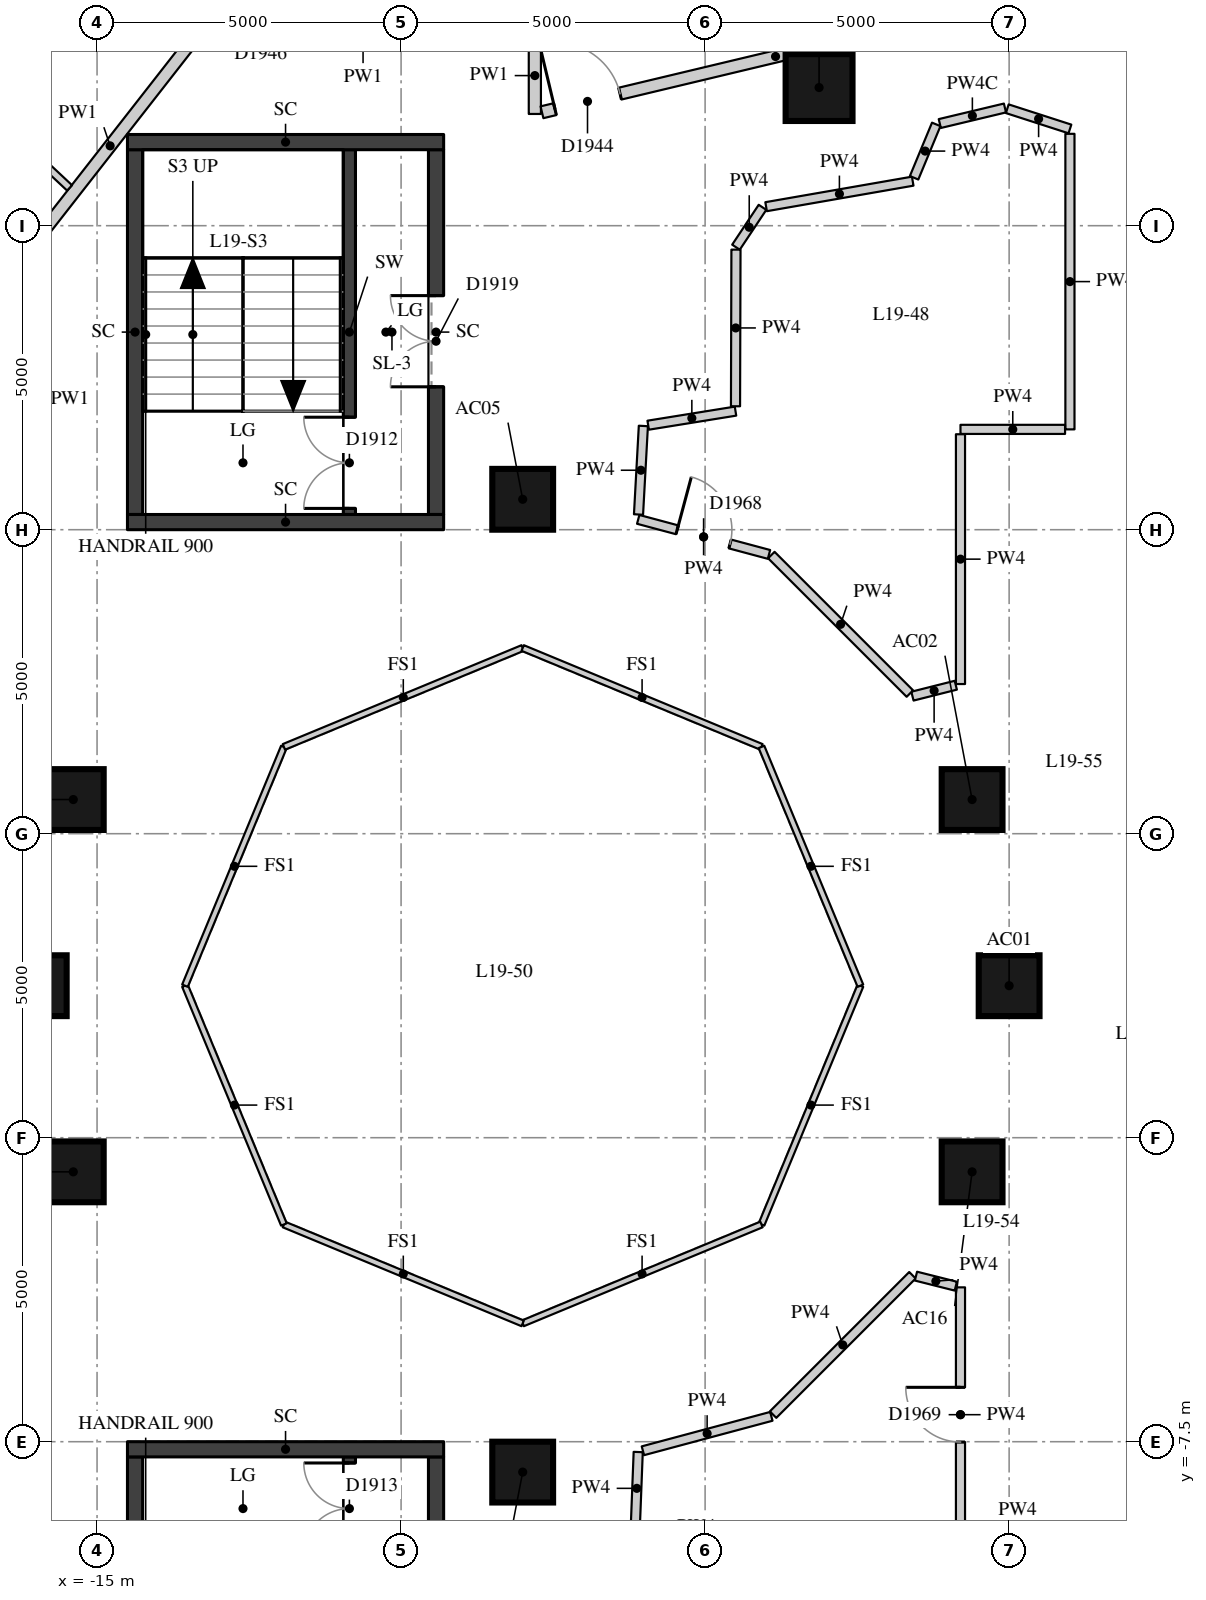
"""IFC4 building model, lengths in metres.
Left out: names, types, materials, properties, quantities, classifications, styles, units other than length and angle.
Written with IfcOpenShell. Run it as: python <this file> out.ifc"""

import sys

from ifc_helpers import new_model, si_unit, direction, frame, frame_2d, origin, origin_2d, place, context, subcontext, project, spatial, rectangle, extrude, element, fill, save


model = new_model("IFC4")
c1 = context("Model", 3, precision=1e-05, world=origin(), true_north=direction((0.0, 1.0)))
c2 = subcontext(c1, "Body", "Model", "MODEL_VIEW")
j1 = project(units=[si_unit("LENGTHUNIT", "METRE"), si_unit("PLANEANGLEUNIT", "RADIAN")], contexts=[c1])
p1 = place(None, origin())
s1 = spatial("IfcSite", under=j1, at=p1, CompositionType="ELEMENT")
p2 = place(p1, origin())
s2 = spatial("IfcBuilding", under=s1, at=p2, CompositionType="ELEMENT")
p3 = place(p2, frame((0.0, 0.0, 71.2)))
s3 = spatial("IfcBuildingStorey", under=s2, at=p3, CompositionType="ELEMENT", Elevation=71.2)
for number, where, z_axis, x_axis in (
    (1, (0.0, 0.0, 0.0), (0.0, 0.0, 1.0), (1.0, 0.0, 0.0)),
    (2, (-0.609, 3.062, 0.0), (0.0, 0.0, 1.0), (1.0, 0.0, 0.0)),
    (3, (-8.0, 8.0, 0.0), (0.0, 0.0, 1.0), (1.0, 0.0, 0.0)),
    (4, (-15.391, 3.062, 0.0), (0.0, 0.0, 1.0), (1.0, 0.0, 0.0)),
    (5, (-16.0, 0.0, 0.0), (0.0, 0.0, 1.0), (1.0, 0.0, 0.0)),
    (6, (-15.391, -3.062, 0.0), (0.0, 0.0, 1.0), (1.0, 0.0, 0.0)),
    (7, (-8.0, -8.0, 0.0), (0.0, 0.0, 1.0), (1.0, 0.0, 0.0)),
    (8, (-0.609, -3.062, 0.0), (0.0, 0.0, 1.0), (1.0, 0.0, 0.0)),
):
    element("IfcColumn", number, at=place(p3, frame(where, z_axis=z_axis, x_axis=x_axis)), inside=s3, PredefinedType="COLUMN", context=c2, shape_type="SweptSolid", body=[
        extrude(rectangle(XDim=1.0, YDim=1.0, at=origin_2d()), origin(), (0.0, 0.0, 1.0), 3.3),
    ])
p4 = place(p3, frame((-3.126, 14.772, 0.0), z_axis=(0.0, 0.0, 1.0), x_axis=(1.0, 0.0, 0.0)))
e9 = element("IfcColumn", 9, at=p4, inside=s3, PredefinedType="COLUMN", context=c2, shape_type="SweptSolid", body=[
    extrude(rectangle(XDim=1.1, YDim=1.1, at=origin_2d()), origin(), (0.0, 0.0, 1.0), 3.3),
])
p5 = place(p3, frame((-10.85, 7.75, 0.0), z_axis=(0.0, 0.0, 1.0), x_axis=(0.0, 1.0, 0.0)))
e10 = element("IfcWall", 10, at=p5, inside=s3, PredefinedType="SHEAR", context=c2, shape_type="SweptSolid", body=[
    extrude(rectangle(XDim=6.0, YDim=0.2, at=frame_2d((3.0, 0.0))), origin(), (0.0, 0.0, 1.0), 3.02),
])
p6 = place(p5, frame((0.1, 0.0, 0.0)))
e11 = element("IfcOpeningElement", 11, at=p6, cuts=e10, PredefinedType="OPENING", context=c2, shape_type="SweptSolid", body=[
    extrude(rectangle(XDim=1.5, YDim=2.1, at=frame_2d((0.75, 1.05))), frame((0.0, 0.11, 0.0), z_axis=(0.0, -1.0, 0.0), x_axis=(1.0, 0.0, 0.0)), (0.0, 0.0, 1.0), 0.22),
])
p7 = place(p3, frame((-10.85, -13.75, 0.0), z_axis=(0.0, 0.0, 1.0), x_axis=(0.0, 1.0, 0.0)))
e12 = element("IfcWall", 12, at=p7, inside=s3, PredefinedType="SHEAR", context=c2, shape_type="SweptSolid", body=[
    extrude(rectangle(XDim=6.0, YDim=0.2, at=frame_2d((3.0, 0.0))), origin(), (0.0, 0.0, 1.0), 3.02),
])
p8 = place(p7, frame((4.4, 0.0, 0.0)))
e13 = element("IfcOpeningElement", 13, at=p8, cuts=e12, PredefinedType="OPENING", context=c2, shape_type="SweptSolid", body=[
    extrude(rectangle(XDim=1.5, YDim=2.1, at=frame_2d((0.75, 1.05))), frame((0.0, 0.11, 0.0), z_axis=(0.0, -1.0, 0.0), x_axis=(1.0, 0.0, 0.0)), (0.0, 0.0, 1.0), 0.22),
])
p9 = place(p3, frame((-14.375, 7.75, -0.28), z_axis=(0.0, 0.0, 1.0), x_axis=(0.0, 1.0, 0.0)))
e14 = element("IfcWall", 14, at=p9, inside=s3, PredefinedType="SHEAR", context=c2, shape_type="SweptSolid", body=[
    extrude(rectangle(XDim=6.0, YDim=0.25, at=frame_2d((3.0, 0.0))), origin(), (0.0, 0.0, 1.0), 3.3),
])
p10 = place(p3, frame((-9.425, 7.75, -0.28), z_axis=(0.0, 0.0, 1.0), x_axis=(0.0, 1.0, 0.0)))
e15 = element("IfcWall", 15, at=p10, inside=s3, PredefinedType="SHEAR", context=c2, shape_type="SweptSolid", body=[
    extrude(rectangle(XDim=6.0, YDim=0.25, at=frame_2d((3.0, 0.0))), origin(), (0.0, 0.0, 1.0), 3.3),
])
p11 = place(p10, frame((2.1, 0.0, 0.28)))
e16 = element("IfcOpeningElement", 16, at=p11, cuts=e15, PredefinedType="OPENING", context=c2, shape_type="SweptSolid", body=[
    extrude(rectangle(XDim=1.5, YDim=2.1, at=frame_2d((0.75, 1.05))), frame((0.0, 0.135, 0.0), z_axis=(0.0, -1.0, 0.0), x_axis=(1.0, 0.0, 0.0)), (0.0, 0.0, 1.0), 0.27),
])
for number, where, z_axis, x_axis in (
    (17, (-14.5, 13.875, -0.28), (0.0, 0.0, 1.0), (1.0, 0.0, 0.0)),
    (18, (-14.5, 7.625, -0.28), (0.0, 0.0, 1.0), (1.0, 0.0, 0.0)),
):
    element("IfcWall", number, at=place(p3, frame(where, z_axis=z_axis, x_axis=x_axis)), inside=s3, PredefinedType="SHEAR", context=c2, shape_type="SweptSolid", body=[
        extrude(rectangle(XDim=5.2, YDim=0.25, at=frame_2d((2.6, 0.0))), origin(), (0.0, 0.0, 1.0), 3.3),
    ])
p12 = place(p3, frame((-14.375, -13.75, -0.28), z_axis=(0.0, 0.0, 1.0), x_axis=(0.0, 1.0, 0.0)))
e19 = element("IfcWall", 19, at=p12, inside=s3, PredefinedType="SHEAR", context=c2, shape_type="SweptSolid", body=[
    extrude(rectangle(XDim=6.0, YDim=0.25, at=frame_2d((3.0, 0.0))), origin(), (0.0, 0.0, 1.0), 3.3),
])
p13 = place(p3, frame((-9.425, -13.75, -0.28), z_axis=(0.0, 0.0, 1.0), x_axis=(0.0, 1.0, 0.0)))
e20 = element("IfcWall", 20, at=p13, inside=s3, PredefinedType="SHEAR", context=c2, shape_type="SweptSolid", body=[
    extrude(rectangle(XDim=6.0, YDim=0.25, at=frame_2d((3.0, 0.0))), origin(), (0.0, 0.0, 1.0), 3.3),
])
p14 = place(p13, frame((2.4, 0.0, 0.28)))
e21 = element("IfcOpeningElement", 21, at=p14, cuts=e20, PredefinedType="OPENING", context=c2, shape_type="SweptSolid", body=[
    extrude(rectangle(XDim=1.5, YDim=2.1, at=frame_2d((0.75, 1.05))), frame((0.0, 0.135, 0.0), z_axis=(0.0, -1.0, 0.0), x_axis=(1.0, 0.0, 0.0)), (0.0, 0.0, 1.0), 0.27),
])
p15 = place(p3, frame((-14.5, -7.625, -0.28), z_axis=(0.0, 0.0, 1.0), x_axis=(1.0, 0.0, 0.0)))
e22 = element("IfcWall", 22, at=p15, inside=s3, PredefinedType="SHEAR", context=c2, shape_type="SweptSolid", body=[
    extrude(rectangle(XDim=5.2, YDim=0.25, at=frame_2d((2.6, 0.0))), origin(), (0.0, 0.0, 1.0), 3.3),
])
p16 = place(p3, frame((-16.163, 12.049, 0.0), z_axis=(0.0, 0.0, 1.0), x_axis=(0.6157435057, 0.787946657578, 0.0)))
e23 = element("IfcWall", 23, at=p16, inside=s3, PredefinedType="PARTITIONING", context=c2, shape_type="SweptSolid", body=[
    extrude(rectangle(XDim=4.477, YDim=0.2, at=frame_2d((2.239, 0.0))), origin(), (0.0, 0.0, 1.0), 3.02),
])
p17 = place(p3, frame((-7.8, 15.6, 0.0), z_axis=(0.0, 0.0, 1.0), x_axis=(0.0, -1.0, 0.0)))
e24 = element("IfcWall", 24, at=p17, inside=s3, PredefinedType="PARTITIONING", context=c2, shape_type="SweptSolid", body=[
    extrude(rectangle(XDim=1.262, YDim=0.2, at=frame_2d((0.631, 0.0))), origin(), (0.0, 0.0, 1.0), 3.02),
])
p18 = place(p3, frame((-7.683, 14.365, 0.0), z_axis=(0.0, 0.0, 1.0), x_axis=(0.972657109353, 0.23224587752, 0.0)))
e25 = element("IfcWall", 25, at=p18, inside=s3, PredefinedType="PARTITIONING", context=c2, shape_type="SweptSolid", body=[
    extrude(rectangle(XDim=7.899, YDim=0.2, at=frame_2d((3.949, 0.0))), origin(), (0.0, 0.0, 1.0), 2.57),
])
p19 = place(p18, frame((0.22, 0.0, 0.0)))
e26 = element("IfcOpeningElement", 26, at=p19, cuts=e25, PredefinedType="OPENING", context=c2, shape_type="SweptSolid", body=[
    extrude(rectangle(XDim=1.1, YDim=2.1, at=frame_2d((0.55, 1.05))), frame((0.0, 0.11, 0.0), z_axis=(0.0, -1.0, 0.0), x_axis=(1.0, 0.0, 0.0)), (0.0, 0.0, 1.0), 0.22),
])
p20 = place(p3, frame((0.095, 16.169, 0.0), z_axis=(0.0, 0.0, 1.0), x_axis=(0.951667112614, -0.307131416122, 0.0)))
e27 = element("IfcWall", 27, at=p20, inside=s3, PredefinedType="PARTITIONING", context=c2, shape_type="SweptSolid", body=[
    extrude(rectangle(XDim=8.041, YDim=0.2, at=frame_2d((4.02, 0.0))), origin(), (0.0, 0.0, 1.0), 3.02),
])
p21 = place(p20, frame((4.309, 0.0, 0.0)))
e28 = element("IfcOpeningElement", 28, at=p21, cuts=e27, PredefinedType="OPENING", context=c2, shape_type="SweptSolid", body=[
    extrude(rectangle(XDim=1.1, YDim=2.1, at=frame_2d((0.55, 1.05))), frame((0.0, 0.11, 0.0), z_axis=(0.0, -1.0, 0.0), x_axis=(1.0, 0.0, 0.0)), (0.0, 0.0, 1.0), 0.22),
])
p22 = place(p3, frame((-4.492, 12.146, 0.0), z_axis=(0.0, 0.0, 1.0), x_axis=(0.553770185429, 0.832669551341, 0.0)))
e29 = element("IfcWall", 29, at=p22, inside=s3, PredefinedType="PARTITIONING", context=c2, shape_type="SweptSolid", body=[
    extrude(rectangle(XDim=0.788, YDim=0.15, at=frame_2d((0.394, 0.0))), origin(), (0.0, 0.0, 1.0), 3.02),
])
p23 = place(p3, frame((-3.997, 12.812, 0.0), z_axis=(0.0, 0.0, 1.0), x_axis=(0.985187584004, 0.171480098917, 0.0)))
e30 = element("IfcWall", 30, at=p23, inside=s3, PredefinedType="PARTITIONING", context=c2, shape_type="SweptSolid", body=[
    extrude(rectangle(XDim=2.447, YDim=0.15, at=frame_2d((1.224, 0.0))), origin(), (0.0, 0.0, 1.0), 3.02),
])
p24 = place(p3, frame((-1.563, 13.288, 0.0), z_axis=(0.0, 0.0, 1.0), x_axis=(0.382918810849, 0.923782000419, 0.0)))
e31 = element("IfcWall", 31, at=p24, inside=s3, PredefinedType="PARTITIONING", context=c2, shape_type="SweptSolid", body=[
    extrude(rectangle(XDim=0.951, YDim=0.15, at=frame_2d((0.475, 0.0))), origin(), (0.0, 0.0, 1.0), 3.02),
])
p25 = place(p3, frame((-1.14, 14.18, 0.0), z_axis=(0.0, 0.0, 1.0), x_axis=(0.972668158826, 0.232199596913, 0.0)))
e32 = element("IfcWall", 32, at=p25, inside=s3, PredefinedType="PARTITIONING", context=c2, shape_type="SweptSolid", body=[
    extrude(rectangle(XDim=1.102, YDim=0.15, at=frame_2d((0.551, 0.0))), origin(), (0.0, 0.0, 1.0), 2.42),
])
p26 = place(p3, frame((-0.031, 14.424, 0.0), z_axis=(0.0, 0.0, 1.0), x_axis=(0.951683114319, -0.307081829354, 0.0)))
e33 = element("IfcWall", 33, at=p26, inside=s3, PredefinedType="PARTITIONING", context=c2, shape_type="SweptSolid", body=[
    extrude(rectangle(XDim=1.083, YDim=0.15, at=frame_2d((0.542, 0.0))), origin(), (0.0, 0.0, 1.0), 3.02),
])
p27 = place(p3, frame((1.0, 14.011, 0.0), z_axis=(0.0, 0.0, 1.0), x_axis=(0.0, -1.0, 0.0)))
e34 = element("IfcWall", 34, at=p27, inside=s3, PredefinedType="PARTITIONING", context=c2, shape_type="SweptSolid", body=[
    extrude(rectangle(XDim=4.861, YDim=0.15, at=frame_2d((2.431, 0.0))), origin(), (0.0, 0.0, 1.0), 3.02),
])
p28 = place(p3, frame((0.92, 9.15, 0.0), z_axis=(0.0, 0.0, 1.0), x_axis=(-1.0, 0.0, 0.0)))
e35 = element("IfcWall", 35, at=p28, inside=s3, PredefinedType="PARTITIONING", context=c2, shape_type="SweptSolid", body=[
    extrude(rectangle(XDim=1.72, YDim=0.15, at=frame_2d((0.86, 0.0))), origin(), (0.0, 0.0, 1.0), 3.02),
])
p29 = place(p3, frame((-0.8, 9.07, 0.0), z_axis=(0.0, 0.0, 1.0), x_axis=(0.0, -1.0, 0.0)))
e36 = element("IfcWall", 36, at=p29, inside=s3, PredefinedType="PARTITIONING", context=c2, shape_type="SweptSolid", body=[
    extrude(rectangle(XDim=4.108, YDim=0.15, at=frame_2d((2.054, 0.0))), origin(), (0.0, 0.0, 1.0), 3.02),
])
p30 = place(p3, frame((-0.877, 4.942, 0.0), z_axis=(0.0, 0.0, 1.0), x_axis=(-0.969671869719, -0.244410443874, 0.0)))
e37 = element("IfcWall", 37, at=p30, inside=s3, PredefinedType="PARTITIONING", context=c2, shape_type="SweptSolid", body=[
    extrude(rectangle(XDim=0.735, YDim=0.15, at=frame_2d((0.368, 0.0))), origin(), (0.0, 0.0, 1.0), 3.02),
])
p31 = place(p3, frame((-1.633, 4.805, 0.0), z_axis=(0.0, 0.0, 1.0), x_axis=(-0.707068892009, 0.707144668334, 0.0)))
e38 = element("IfcWall", 38, at=p31, inside=s3, PredefinedType="PARTITIONING", context=c2, shape_type="SweptSolid", body=[
    extrude(rectangle(XDim=3.222, YDim=0.15, at=frame_2d((1.611, 0.0))), origin(), (0.0, 0.0, 1.0), 3.02),
])
p32 = place(p3, frame((-3.949, 7.093, 0.0), z_axis=(0.0, 0.0, 1.0), x_axis=(-0.965915749371, 0.258856649746, 0.0)))
e39 = element("IfcWall", 39, at=p32, inside=s3, PredefinedType="PARTITIONING", context=c2, shape_type="SweptSolid", body=[
    extrude(rectangle(XDim=2.227, YDim=0.15, at=frame_2d((1.113, 0.0))), origin(), (0.0, 0.0, 1.0), 3.02),
])
p33 = place(p32, frame((0.663, 0.0, 0.0)))
e40 = element("IfcOpeningElement", 40, at=p33, cuts=e39, PredefinedType="OPENING", context=c2, shape_type="SweptSolid", body=[
    extrude(rectangle(XDim=0.9, YDim=2.1, at=frame_2d((0.45, 1.05))), frame((0.0, 0.085, 0.0), z_axis=(0.0, -1.0, 0.0), x_axis=(1.0, 0.0, 0.0)), (0.0, 0.0, 1.0), 0.17),
])
p34 = place(p3, frame((-6.095, 7.75, 0.0), z_axis=(0.0, 0.0, 1.0), x_axis=(0.05473759482, 0.998500774017, 0.0)))
e41 = element("IfcWall", 41, at=p34, inside=s3, PredefinedType="PARTITIONING", context=c2, shape_type="SweptSolid", body=[
    extrude(rectangle(XDim=1.458, YDim=0.15, at=frame_2d((0.729, 0.0))), origin(), (0.0, 0.0, 1.0), 3.02),
])
p35 = place(p3, frame((-5.936, 9.219, 0.0), z_axis=(0.0, 0.0, 1.0), x_axis=(0.987290432374, 0.158926404803, 0.0)))
e42 = element("IfcWall", 42, at=p35, inside=s3, PredefinedType="PARTITIONING", context=c2, shape_type="SweptSolid", body=[
    extrude(rectangle(XDim=1.455, YDim=0.15, at=frame_2d((0.728, 0.0))), origin(), (0.0, 0.0, 1.0), 3.02),
])
p36 = place(p3, frame((-4.5, 9.53, 0.0), z_axis=(0.0, 0.0, 1.0), x_axis=(0.002937819013, 0.9999956846, 0.0)))
e43 = element("IfcWall", 43, at=p36, inside=s3, PredefinedType="PARTITIONING", context=c2, shape_type="SweptSolid", body=[
    extrude(rectangle(XDim=2.576, YDim=0.15, at=frame_2d((1.288, 0.0))), origin(), (0.0, 0.0, 1.0), 3.02),
])
p37 = place(p3, frame((-0.8, -4.961, 0.0), z_axis=(0.0, 0.0, 1.0), x_axis=(0.0, -1.0, 0.0)))
e44 = element("IfcWall", 44, at=p37, inside=s3, PredefinedType="PARTITIONING", context=c2, shape_type="SweptSolid", body=[
    extrude(rectangle(XDim=4.188, YDim=0.15, at=frame_2d((2.094, 0.0))), origin(), (0.0, 0.0, 1.0), 3.02),
])
p38 = place(p37, frame((1.644, 0.0, 0.0)))
e45 = element("IfcOpeningElement", 45, at=p38, cuts=e44, PredefinedType="OPENING", context=c2, shape_type="SweptSolid", body=[
    extrude(rectangle(XDim=0.9, YDim=2.1, at=frame_2d((0.45, 1.05))), frame((0.0, 0.085, 0.0), z_axis=(0.0, -1.0, 0.0), x_axis=(1.0, 0.0, 0.0)), (0.0, 0.0, 1.0), 0.17),
])
p39 = place(p3, frame((-6.146, -8.865, 0.0), z_axis=(0.0, 0.0, 1.0), x_axis=(0.038582079081, 0.999255434398, 0.0)))
e46 = element("IfcWall", 46, at=p39, inside=s3, PredefinedType="PARTITIONING", context=c2, shape_type="SweptSolid", body=[
    extrude(rectangle(XDim=1.196, YDim=0.15, at=frame_2d((0.598, 0.0))), origin(), (0.0, 0.0, 1.0), 3.02),
])
p40 = place(p3, frame((-6.023, -7.649, 0.0), z_axis=(0.0, 0.0, 1.0), x_axis=(0.965906186456, 0.258892330836, 0.0)))
e47 = element("IfcWall", 47, at=p40, inside=s3, PredefinedType="PARTITIONING", context=c2, shape_type="SweptSolid", body=[
    extrude(rectangle(XDim=2.187, YDim=0.15, at=frame_2d((1.093, 0.0))), origin(), (0.0, 0.0, 1.0), 3.02),
])
p41 = place(p3, frame((-3.882, -7.055, 0.0), z_axis=(0.0, 0.0, 1.0), x_axis=(0.707069126061, 0.707144434307, 0.0)))
e48 = element("IfcWall", 48, at=p41, inside=s3, PredefinedType="PARTITIONING", context=c2, shape_type="SweptSolid", body=[
    extrude(rectangle(XDim=3.242, YDim=0.15, at=frame_2d((1.621, 0.0))), origin(), (0.0, 0.0, 1.0), 3.02),
])
p42 = place(p3, frame((-1.532, -4.777, 0.0), z_axis=(0.0, 0.0, 1.0), x_axis=(0.969694394352, -0.244321062461, 0.0)))
e49 = element("IfcWall", 49, at=p42, inside=s3, PredefinedType="PARTITIONING", context=c2, shape_type="SweptSolid", body=[
    extrude(rectangle(XDim=0.676, YDim=0.15, at=frame_2d((0.338, 0.0))), origin(), (0.0, 0.0, 1.0), 3.02),
])
p43 = place(p3, frame((-15.452, 13.122, 0.0), z_axis=(0.0, 0.0, 1.0), x_axis=(-0.730035995084, 0.683408696083, 0.0)))
e50 = element("IfcWall", 50, at=p43, inside=s3, PredefinedType="PARTITIONING", context=c2, shape_type="SweptSolid", body=[
    extrude(rectangle(XDim=1.953, YDim=0.12, at=frame_2d((0.977, 0.0))), origin(), (0.0, 0.0, 1.0), 3.02),
])
for number, where, z_axis, x_axis in (
    (51, (-2.446, 0.0, 0.0), (0.0, 0.0, 1.0), (-0.383, -0.924, 0.0)),
    (52, (-4.073, -3.927, 0.0), (0.0, 0.0, 1.0), (-0.924, -0.383, 0.0)),
    (53, (-8.0, -5.554, 0.0), (0.0, 0.0, 1.0), (-0.924, 0.383, 0.0)),
    (54, (-11.927, -3.927, 0.0), (0.0, 0.0, 1.0), (-0.383, 0.924, 0.0)),
    (55, (-13.554, 0.0, 0.0), (0.0, 0.0, 1.0), (0.383, 0.924, 0.0)),
    (56, (-11.927, 3.927, 0.0), (0.0, 0.0, 1.0), (0.924, 0.383, 0.0)),
    (57, (-8.0, 5.554, 0.0), (0.0, 0.0, 1.0), (0.924, -0.383, 0.0)),
    (58, (-4.073, 3.927, 0.0), (0.0, 0.0, 1.0), (0.383, -0.924, 0.0)),
):
    element("IfcWall", number, at=place(p3, frame(where, z_axis=z_axis, x_axis=x_axis)), inside=s3, PredefinedType="PARTITIONING", context=c2, shape_type="SweptSolid", body=[
        extrude(rectangle(XDim=4.251, YDim=0.1, at=frame_2d((2.125, 0.0))), origin(), (0.0, 0.0, 1.0), 3.02),
    ])
p44 = place(p6, origin())
e59 = element("IfcDoor", 59, at=p44, inside=s3, OperationType="DOUBLE_DOOR_SINGLE_SWING", PredefinedType="DOOR", context=c2, shape_type="SweptSolid", body=[
    extrude(rectangle(XDim=1.5, YDim=2.1, at=frame_2d((0.75, 1.05))), frame((0.0, 0.025, 0.0), z_axis=(0.0, -1.0, 0.0), x_axis=(1.0, 0.0, 0.0)), (0.0, 0.0, 1.0), 0.05),
])
fill(e11, e59)
p45 = place(p8, origin())
e60 = element("IfcDoor", 60, at=p45, inside=s3, OperationType="DOUBLE_DOOR_SINGLE_SWING", PredefinedType="DOOR", context=c2, shape_type="SweptSolid", body=[
    extrude(rectangle(XDim=1.5, YDim=2.1, at=frame_2d((0.75, 1.05))), frame((0.0, 0.025, 0.0), z_axis=(0.0, -1.0, 0.0), x_axis=(1.0, 0.0, 0.0)), (0.0, 0.0, 1.0), 0.05),
])
fill(e13, e60)
p46 = place(p11, origin())
e61 = element("IfcDoor", 61, at=p46, inside=s3, OperationType="DOUBLE_DOOR_SINGLE_SWING", PredefinedType="DOOR", context=c2, shape_type="SweptSolid", body=[
    extrude(rectangle(XDim=1.5, YDim=2.1, at=frame_2d((0.75, 1.05))), frame((0.0, 0.025, 0.0), z_axis=(0.0, -1.0, 0.0), x_axis=(1.0, 0.0, 0.0)), (0.0, 0.0, 1.0), 0.05),
])
fill(e16, e61)
p47 = place(p19, origin())
e62 = element("IfcDoor", 62, at=p47, inside=s3, OperationType="SINGLE_SWING_LEFT", PredefinedType="DOOR", context=c2, shape_type="SweptSolid", body=[
    extrude(rectangle(XDim=1.1, YDim=2.1, at=frame_2d((0.55, 1.05))), frame((0.0, 0.025, 0.0), z_axis=(0.0, -1.0, 0.0), x_axis=(1.0, 0.0, 0.0)), (0.0, 0.0, 1.0), 0.05),
])
fill(e26, e62)
p48 = place(p33, origin())
e63 = element("IfcDoor", 63, at=p48, inside=s3, OperationType="SINGLE_SWING_LEFT", PredefinedType="DOOR", context=c2, shape_type="SweptSolid", body=[
    extrude(rectangle(XDim=0.9, YDim=2.1, at=frame_2d((0.45, 1.05))), frame((0.0, 0.025, 0.0), z_axis=(0.0, -1.0, 0.0), x_axis=(1.0, 0.0, 0.0)), (0.0, 0.0, 1.0), 0.05),
])
fill(e40, e63)
p49 = place(p38, origin())
e64 = element("IfcDoor", 64, at=p49, inside=s3, OperationType="SINGLE_SWING_RIGHT", PredefinedType="DOOR", context=c2, shape_type="SweptSolid", body=[
    extrude(rectangle(XDim=0.9, YDim=2.1, at=frame_2d((0.45, 1.05))), frame((0.0, 0.025, 0.0), z_axis=(0.0, -1.0, 0.0), x_axis=(1.0, 0.0, 0.0)), (0.0, 0.0, 1.0), 0.05),
])
fill(e45, e64)
save(model, sys.argv[1])
